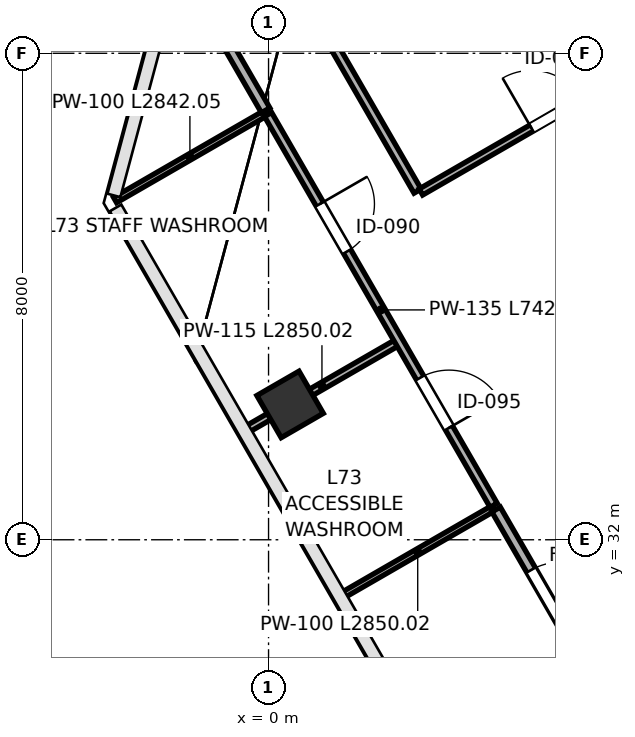
"""IFC4 building model, lengths in metres.
Left out: names, types, materials, properties, quantities, classifications, styles, units other than length and angle.
Written with IfcOpenShell. Run it as: python <this file> out.ifc"""

import sys

from ifc_helpers import new_model, si_unit, direction, frame, frame_2d, origin, origin_2d, place, context, subcontext, project, spatial, rectangle, extrude, clip, halfspace, source, transform, mapped, element, fill, save


model = new_model("IFC4")
c1 = context("Model", 3, precision=1e-05, world=origin(), true_north=direction((0.0, 1.0)))
c2 = subcontext(c1, "Body", "Model", "MODEL_VIEW")
j1 = project(units=[si_unit("LENGTHUNIT", "METRE"), si_unit("PLANEANGLEUNIT", "RADIAN")], contexts=[c1])
p1 = place(None, origin())
s1 = spatial("IfcSite", under=j1, at=p1, CompositionType="ELEMENT")
p2 = place(p1, origin())
s2 = spatial("IfcBuilding", under=s1, at=p2, CompositionType="ELEMENT")
p3 = place(p2, frame((0.0, 0.0, 324.0)))
s3 = spatial("IfcBuildingStorey", under=s2, at=p3, CompositionType="ELEMENT", Elevation=324.0)
p4 = place(p3, frame((0.354, 34.225, 0.0), z_axis=(0.027245519526, 0.213934089781, 0.976468067525), x_axis=(0.389159716238, -0.902037765523, 0.186768800469)))
e1 = element("IfcColumn", 1, at=p4, inside=s3, PredefinedType="COLUMN", context=c2, shape_type="Clipping", body=[
    clip(clip(extrude(rectangle(XDim=0.8, YDim=0.8, at=origin_2d()), origin(), (0.0, 0.0, 1.0), 4.301), halfspace(frame((0.0, 0.0, 0.121), z_axis=(0.0, 0.0, -1.0), x_axis=(1.0, 0.0, 0.0)), False)), halfspace(frame((0.0, 0.0, 4.18), z_axis=(0.0, 0.0, 1.0), x_axis=(1.0, 0.0, 0.0)), False)),
])
p5 = place(p3, frame((-2.524, 37.586, 0.0), z_axis=(0.0, 0.0, 1.0), x_axis=(0.866019653938, 0.500009958894, 0.0)))
e2 = element("IfcWall", 2, at=p5, inside=s3, PredefinedType="PARTITIONING", context=c2, shape_type="SweptSolid", body=[
    extrude(rectangle(XDim=2.842, YDim=0.1, at=frame_2d((1.421, 0.0))), origin(), (0.0, 0.0, 1.0), 3.96),
])
p6 = place(p3, frame((-1.469, 41.523, 0.0), z_axis=(0.0, 0.0, 1.0), x_axis=(0.499945532396, -0.866056848387, 0.0)))
e3 = element("IfcWall", 3, at=p6, inside=s3, PredefinedType="PARTITIONING", context=c2, shape_type="SweptSolid", body=[
    extrude(rectangle(XDim=2.842, YDim=0.16, at=frame_2d((1.421, 0.0))), origin(), (0.0, 0.0, 1.0), 3.96),
])
p7 = place(p3, frame((-0.356, 33.815, 0.0), z_axis=(0.0, 0.0, 1.0), x_axis=(0.866004402611, 0.500036373335, 0.0)))
e4 = element("IfcWall", 4, at=p7, inside=s3, PredefinedType="PARTITIONING", context=c2, shape_type="SweptSolid", body=[
    extrude(rectangle(XDim=2.85, YDim=0.115, at=frame_2d((1.425, 0.0))), origin(), (0.0, 0.0, 1.0), 3.295),
])
p8 = place(p3, frame((1.219, 31.087, 0.0), z_axis=(0.0, 0.0, 1.0), x_axis=(0.866062911188, 0.499935029643, 0.0)))
e5 = element("IfcWall", 5, at=p8, inside=s3, PredefinedType="PARTITIONING", context=c2, shape_type="SweptSolid", body=[
    extrude(rectangle(XDim=2.85, YDim=0.1, at=frame_2d((1.425, 0.0))), origin(), (0.0, 0.0, 1.0), 3.295),
])
p9 = place(p3, frame((-0.008, 38.993, 0.0), z_axis=(0.0, 0.0, 1.0), x_axis=(0.49998923004, -0.866031621735, 0.0)))
e6 = element("IfcWall", 6, at=p9, inside=s3, PredefinedType="PARTITIONING", context=c2, shape_type="SweptSolid", body=[
    extrude(rectangle(XDim=7.42, YDim=0.135, at=frame_2d((3.71, 0.0))), origin(), (0.0, 0.0, 1.0), 3.96),
])
p10 = place(p9, frame((1.7, 0.0, 0.0)))
e7 = element("IfcOpeningElement", 7, at=p10, cuts=e6, PredefinedType="OPENING", context=c2, shape_type="SweptSolid", body=[
    extrude(rectangle(XDim=0.9, YDim=2.15, at=frame_2d((0.45, 1.075))), frame((0.0, 0.078, 0.0), z_axis=(0.0, -1.0, 0.0), x_axis=(1.0, 0.0, 0.0)), (0.0, 0.0, 1.0), 0.155),
])
p11 = place(p9, frame((5.0, 0.0, 0.0)))
e8 = element("IfcOpeningElement", 8, at=p11, cuts=e6, PredefinedType="OPENING", context=c2, shape_type="SweptSolid", body=[
    extrude(rectangle(XDim=0.95, YDim=2.15, at=frame_2d((0.475, 1.075))), frame((0.0, 0.078, 0.0), z_axis=(0.0, -1.0, 0.0), x_axis=(1.0, 0.0, 0.0)), (0.0, 0.0, 1.0), 0.155),
])
p12 = place(p3, frame((3.742, 32.498, 0.0), z_axis=(0.0, 0.0, 1.0), x_axis=(0.500005830994, -0.866022037233, 0.0)))
e9 = element("IfcWall", 9, at=p12, inside=s3, PredefinedType="PARTITIONING", context=c2, shape_type="SweptSolid", body=[
    extrude(rectangle(XDim=14.07, YDim=0.16, at=frame_2d((7.035, 0.0))), origin(), (0.0, 0.0, 1.0), 3.96),
])
p13 = place(p12, frame((1.15, 0.0, 0.0)))
e10 = element("IfcOpeningElement", 10, at=p13, cuts=e9, PredefinedType="OPENING", context=c2, shape_type="SweptSolid", body=[
    extrude(rectangle(XDim=0.95, YDim=2.15, at=frame_2d((0.475, 1.075))), frame((0.0, 0.09, 0.0), z_axis=(0.0, -1.0, 0.0), x_axis=(1.0, 0.0, 0.0)), (0.0, 0.0, 1.0), 0.18),
])
p14 = place(p3, frame((-0.564, 42.956, 0.0), z_axis=(0.0, 0.0, 1.0), x_axis=(0.500014506688, -0.866017028182, 0.0)))
e11 = element("IfcWall", 11, at=p14, inside=s3, PredefinedType="PARTITIONING", context=c2, shape_type="SweptSolid", body=[
    extrude(rectangle(XDim=6.03, YDim=0.135, at=frame_2d((3.015, 0.0))), origin(), (0.0, 0.0, 1.0), 3.96),
])
p15 = place(p3, frame((2.506, 37.719, 0.0), z_axis=(0.0, 0.0, 1.0), x_axis=(0.866023290802, 0.500003659775, 0.0)))
e12 = element("IfcWall", 12, at=p15, inside=s3, PredefinedType="PARTITIONING", context=c2, shape_type="SweptSolid", body=[
    extrude(rectangle(XDim=29.61, YDim=0.115, at=frame_2d((14.805, 0.0))), origin(), (0.0, 0.0, 1.0), 3.96),
])
p16 = place(p15, frame((2.1, 0.0, 0.0)))
e13 = element("IfcOpeningElement", 13, at=p16, cuts=e12, PredefinedType="OPENING", context=c2, shape_type="SweptSolid", body=[
    extrude(rectangle(XDim=0.95, YDim=2.15, at=frame_2d((0.475, 1.075))), frame((0.0, 0.067, 0.0), z_axis=(0.0, -1.0, 0.0), x_axis=(1.0, 0.0, 0.0)), (0.0, 0.0, 1.0), 0.135),
])
p17 = place(p15, frame((11.8, 0.0, 0.0)))
e14 = element("IfcOpeningElement", 14, at=p17, cuts=e12, PredefinedType="OPENING", context=c2, shape_type="SweptSolid", body=[
    extrude(rectangle(XDim=0.95, YDim=2.15, at=frame_2d((0.475, 1.075))), frame((0.0, 0.067, 0.0), z_axis=(0.0, -1.0, 0.0), x_axis=(1.0, 0.0, 0.0)), (0.0, 0.0, 1.0), 0.135),
])
m1 = source(origin(), c2, "Body", "SweptSolid", [
    extrude(rectangle(XDim=0.9, YDim=2.15, at=frame_2d((0.45, 1.075))), frame((0.0, 0.025, 0.0), z_axis=(0.0, -1.0, 0.0), x_axis=(1.0, 0.0, 0.0)), (0.0, 0.0, 1.0), 0.05),
])
p18 = place(p10, origin())
e15 = element("IfcDoor", 15, at=p18, inside=s3, OperationType="SINGLE_SWING_LEFT", PredefinedType="DOOR", context=c2, shape_type="MappedRepresentation", body=[
    mapped(m1, transform((0.0, 0.0, 0.0), scale=1.0)),
])
fill(e7, e15)
m2 = source(origin(), c2, "Body", "SweptSolid", [
    extrude(rectangle(XDim=0.95, YDim=2.15, at=frame_2d((0.475, 1.075))), frame((0.0, 0.025, 0.0), z_axis=(0.0, -1.0, 0.0), x_axis=(1.0, 0.0, 0.0)), (0.0, 0.0, 1.0), 0.05),
])
p19 = place(p11, origin())
e16 = element("IfcDoor", 16, at=p19, inside=s3, OperationType="SINGLE_SWING_RIGHT", PredefinedType="DOOR", context=c2, shape_type="MappedRepresentation", body=[
    mapped(m2, transform((0.0, 0.0, 0.0), scale=1.0)),
])
fill(e8, e16)
m3 = source(origin(), c2, "Body", "SweptSolid", [
    extrude(rectangle(XDim=0.95, YDim=2.15, at=frame_2d((0.475, 1.075))), frame((0.0, 0.025, 0.0), z_axis=(0.0, -1.0, 0.0), x_axis=(1.0, 0.0, 0.0)), (0.0, 0.0, 1.0), 0.05),
])
p20 = place(p13, origin())
e17 = element("IfcDoor", 17, at=p20, inside=s3, OperationType="SINGLE_SWING_RIGHT", PredefinedType="DOOR", context=c2, shape_type="MappedRepresentation", body=[
    mapped(m3, transform((0.0, 0.0, 0.0), scale=1.0)),
])
fill(e10, e17)
p21 = place(p16, origin())
e18 = element("IfcDoor", 18, at=p21, inside=s3, OperationType="SINGLE_SWING_LEFT", PredefinedType="DOOR", context=c2, shape_type="MappedRepresentation", body=[
    mapped(m2, transform((0.0, 0.0, 0.0), scale=1.0)),
])
fill(e13, e18)
save(model, sys.argv[1])
